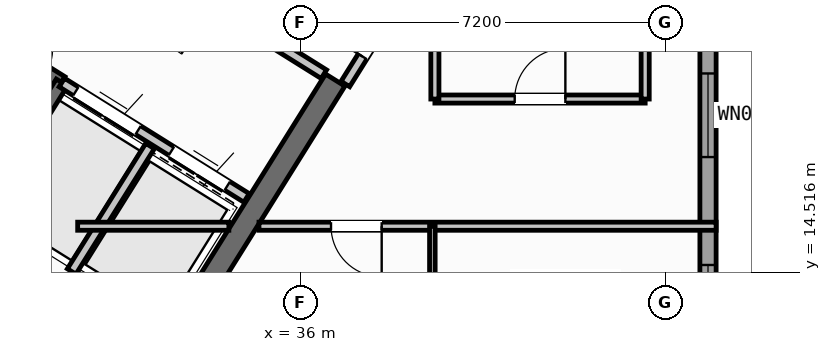
"""IFC4 building model, lengths in metres.
Left out: names, types, materials, properties, quantities, classifications, styles, units other than length and angle.
Written with IfcOpenShell. Run it as: python <this file> out.ifc"""

import sys

from ifc_helpers import new_model, si_unit, direction, frame, frame_2d, origin, place, context, subcontext, project, spatial, rectangle, extrude, source, transform, mapped, element, fill, save


model = new_model("IFC4")
c1 = context("Model", 3, precision=1e-05, world=origin(), true_north=direction((0.0, 1.0)))
c2 = subcontext(c1, "Body", "Model", "MODEL_VIEW")
j1 = project(units=[si_unit("LENGTHUNIT", "METRE"), si_unit("PLANEANGLEUNIT", "RADIAN")], contexts=[c1])
p1 = place(None, origin())
s1 = spatial("IfcSite", under=j1, at=p1, CompositionType="ELEMENT")
p2 = place(p1, origin())
s2 = spatial("IfcBuilding", under=s1, at=p2, CompositionType="ELEMENT")
p3 = place(p2, frame((0.0, 0.0, 280.8)))
s3 = spatial("IfcBuildingStorey", under=s2, at=p3, CompositionType="ELEMENT", Elevation=280.8)
p4 = place(p3, frame((33.324, 12.503, 0.0), z_axis=(0.0, 0.0, 1.0), x_axis=(-0.848043529849, 0.529926571782, 0.0)))
e1 = element("IfcWall", 1, at=p4, inside=s3, PredefinedType="SHEAR", context=c2, shape_type="SweptSolid", body=[
    extrude(rectangle(XDim=13.04, YDim=0.45, at=frame_2d((6.52, 0.0))), origin(), (0.0, 0.0, 1.0), 3.35),
])
p5 = place(p3, frame((36.683, 18.304, 0.0), z_axis=(0.0, 0.0, 1.0), x_axis=(-0.529904039071, -0.848057609704, 0.0)))
e2 = element("IfcWall", 2, at=p5, inside=s3, PredefinedType="SHEAR", context=c2, shape_type="SweptSolid", body=[
    extrude(rectangle(XDim=6.475, YDim=0.45, at=frame_2d((3.238, 0.0))), origin(), (0.0, 0.0, 1.0), 3.35),
])
p6 = place(p3, frame((44.04, 23.04, 0.0), z_axis=(0.0, 0.0, 1.0), x_axis=(0.0, -1.0, 0.0)))
e3 = element("IfcWall", 3, at=p6, inside=s3, PredefinedType="STANDARD", context=c2, shape_type="SweptSolid", body=[
    extrude(rectangle(XDim=21.08, YDim=0.32, at=frame_2d((10.54, 0.0))), origin(), (0.0, 0.0, 1.0), 3.35),
])
p7 = place(p6, frame((1.285, 0.0, 0.9)))
e4 = element("IfcOpeningElement", 4, at=p7, cuts=e3, PredefinedType="OPENING", context=c2, shape_type="SweptSolid", body=[
    extrude(rectangle(XDim=1.65, YDim=1.45, at=frame_2d((0.825, 0.725))), frame((0.0, 0.17, 0.0), z_axis=(0.0, -1.0, 0.0), x_axis=(1.0, 0.0, 0.0)), (0.0, 0.0, 1.0), 0.34),
])
p8 = place(p6, frame((4.605, 0.0, 0.9)))
e5 = element("IfcOpeningElement", 5, at=p8, cuts=e3, PredefinedType="OPENING", context=c2, shape_type="SweptSolid", body=[
    extrude(rectangle(XDim=1.65, YDim=1.45, at=frame_2d((0.825, 0.725))), frame((0.0, 0.17, 0.0), z_axis=(0.0, -1.0, 0.0), x_axis=(1.0, 0.0, 0.0)), (0.0, 0.0, 1.0), 0.34),
])
p9 = place(p6, frame((8.385, 0.0, 0.95)))
e6 = element("IfcOpeningElement", 6, at=p9, cuts=e3, PredefinedType="OPENING", context=c2, shape_type="SweptSolid", body=[
    extrude(rectangle(XDim=1.95, YDim=1.35, at=frame_2d((0.975, 0.675))), frame((0.0, 0.17, 0.0), z_axis=(0.0, -1.0, 0.0), x_axis=(1.0, 0.0, 0.0)), (0.0, 0.0, 1.0), 0.34),
])
p10 = place(p6, frame((12.354, 0.0, 1.0)))
e7 = element("IfcOpeningElement", 7, at=p10, cuts=e3, PredefinedType="OPENING", context=c2, shape_type="SweptSolid", body=[
    extrude(rectangle(XDim=0.9, YDim=1.25, at=frame_2d((0.45, 0.625))), frame((0.0, 0.17, 0.0), z_axis=(0.0, -1.0, 0.0), x_axis=(1.0, 0.0, 0.0)), (0.0, 0.0, 1.0), 0.34),
])
p11 = place(p6, frame((14.741, 0.0, 1.0)))
e8 = element("IfcOpeningElement", 8, at=p11, cuts=e3, PredefinedType="OPENING", context=c2, shape_type="SweptSolid", body=[
    extrude(rectangle(XDim=0.9, YDim=1.25, at=frame_2d((0.45, 0.625))), frame((0.0, 0.17, 0.0), z_axis=(0.0, -1.0, 0.0), x_axis=(1.0, 0.0, 0.0)), (0.0, 0.0, 1.0), 0.34),
])
p12 = place(p6, frame((18.337, 0.0, 0.9)))
e9 = element("IfcOpeningElement", 9, at=p12, cuts=e3, PredefinedType="OPENING", context=c2, shape_type="SweptSolid", body=[
    extrude(rectangle(XDim=1.35, YDim=1.45, at=frame_2d((0.675, 0.725))), frame((0.0, 0.17, 0.0), z_axis=(0.0, -1.0, 0.0), x_axis=(1.0, 0.0, 0.0)), (0.0, 0.0, 1.0), 0.34),
])
p13 = place(p3, frame((31.28, 18.261, 0.0), z_axis=(0.0, 0.0, 1.0), x_axis=(-0.848051618787, 0.529913626805, 0.0)))
e10 = element("IfcWall", 10, at=p13, inside=s3, PredefinedType="SHEAR", context=c2, shape_type="SweptSolid", body=[
    extrude(rectangle(XDim=7.46, YDim=0.26, at=frame_2d((3.73, 0.0))), origin(), (0.0, 0.0, 1.0), 3.35),
])
p14 = place(p13, frame((0.36, 0.0, 0.0)))
e11 = element("IfcOpeningElement", 11, at=p14, cuts=e10, PredefinedType="OPENING", context=c2, shape_type="SweptSolid", body=[
    extrude(rectangle(XDim=0.86, YDim=2.05, at=frame_2d((0.43, 1.025))), frame((0.0, 0.14, 0.0), z_axis=(0.0, -1.0, 0.0), x_axis=(1.0, 0.0, 0.0)), (0.0, 0.0, 1.0), 0.28),
])
p15 = place(p3, frame((31.288, 18.256, 0.0), z_axis=(0.0, 0.0, 1.0), x_axis=(-0.529943379326, -0.848033026897, 0.0)))
e12 = element("IfcWall", 12, at=p15, inside=s3, PredefinedType="SHEAR", context=c2, shape_type="SweptSolid", body=[
    extrude(rectangle(XDim=3.16, YDim=0.26, at=frame_2d((1.58, 0.0))), origin(), (0.0, 0.0, 1.0), 3.35),
])
p16 = place(p3, frame((34.933, 15.978, 0.0), z_axis=(0.0, 0.0, 1.0), x_axis=(-0.848055739377, 0.529907032327, 0.0)))
e13 = element("IfcWall", 13, at=p16, inside=s3, PredefinedType="STANDARD", context=c2, shape_type="SweptSolid", body=[
    extrude(rectangle(XDim=4.298, YDim=0.2, at=frame_2d((2.149, 0.0))), origin(), (0.0, 0.0, 1.0), 3.34),
])
p17 = place(p16, frame((0.448, 0.0, 0.0)))
e14 = element("IfcOpeningElement", 14, at=p17, cuts=e13, PredefinedType="OPENING", context=c2, shape_type="SweptSolid", body=[
    extrude(rectangle(XDim=1.3, YDim=2.2, at=frame_2d((0.65, 1.1))), frame((0.0, 0.11, 0.0), z_axis=(0.0, -1.0, 0.0), x_axis=(1.0, 0.0, 0.0)), (0.0, 0.0, 1.0), 0.22),
])
p18 = place(p16, frame((2.523, 0.0, 0.0)))
e15 = element("IfcOpeningElement", 15, at=p18, cuts=e13, PredefinedType="OPENING", context=c2, shape_type="SweptSolid", body=[
    extrude(rectangle(XDim=1.45, YDim=2.25, at=frame_2d((0.725, 1.125))), frame((0.0, 0.11, 0.0), z_axis=(0.0, -1.0, 0.0), x_axis=(1.0, 0.0, 0.0)), (0.0, 0.0, 1.0), 0.22),
])
p19 = place(p3, frame((36.459, 18.421, 0.0), z_axis=(0.0, 0.0, 1.0), x_axis=(-0.848059591691, 0.529900867089, 0.0)))
e16 = element("IfcWall", 16, at=p19, inside=s3, PredefinedType="STANDARD", context=c2, shape_type="SweptSolid", body=[
    extrude(rectangle(XDim=5.818, YDim=0.2, at=frame_2d((2.909, 0.0))), origin(), (0.0, 0.0, 1.0), 3.34),
])
p20 = place(p19, frame((2.598, 0.0, 0.0)))
e17 = element("IfcOpeningElement", 17, at=p20, cuts=e16, PredefinedType="OPENING", context=c2, shape_type="SweptSolid", body=[
    extrude(rectangle(XDim=1.15, YDim=2.1, at=frame_2d((0.575, 1.05))), frame((0.0, 0.11, 0.0), z_axis=(0.0, -1.0, 0.0), x_axis=(1.0, 0.0, 0.0)), (0.0, 0.0, 1.0), 0.22),
])
p21 = place(p3, frame((33.029, 17.003, 0.0), z_axis=(0.0, 0.0, 1.0), x_axis=(-0.529916267533, -0.848049968695, 0.0)))
e18 = element("IfcWall", 18, at=p21, inside=s3, PredefinedType="STANDARD", context=c2, shape_type="SweptSolid", body=[
    extrude(rectangle(XDim=2.92, YDim=0.2, at=frame_2d((1.46, 0.0))), origin(), (0.0, 0.0, 1.0), 3.34),
])
p22 = place(p3, frame((32.164, 10.374, 0.0), z_axis=(0.0, 0.0, 1.0), x_axis=(-0.848044107957, 0.529925646633, 0.0)))
e19 = element("IfcWall", 19, at=p22, inside=s3, PredefinedType="PARTITIONING", context=c2, shape_type="SweptSolid", body=[
    extrude(rectangle(XDim=15.57, YDim=0.16, at=frame_2d((7.785, 0.0))), origin(), (0.0, 0.0, 1.0), 3.34),
])
p23 = place(p22, frame((10.83, 0.0, 0.0)))
e20 = element("IfcOpeningElement", 20, at=p23, cuts=e19, PredefinedType="OPENING", context=c2, shape_type="SweptSolid", body=[
    extrude(rectangle(XDim=1.0, YDim=2.1, at=frame_2d((0.5, 1.05))), frame((0.0, 0.09, 0.0), z_axis=(0.0, -1.0, 0.0), x_axis=(1.0, 0.0, 0.0)), (0.0, 0.0, 1.0), 0.18),
])
p24 = place(p3, frame((38.451, 20.737, 0.0), z_axis=(0.0, 0.0, 1.0), x_axis=(-0.529924799939, -0.848044637038, 0.0)))
e21 = element("IfcWall", 21, at=p24, inside=s3, PredefinedType="STANDARD", context=c2, shape_type="SweptSolid", body=[
    extrude(rectangle(XDim=2.96, YDim=0.2, at=frame_2d((1.48, 0.0))), origin(), (0.0, 0.0, 1.0), 3.34),
])
p25 = place(p24, frame((1.46, 0.0, 0.0)))
e22 = element("IfcOpeningElement", 22, at=p25, cuts=e21, PredefinedType="OPENING", context=c2, shape_type="SweptSolid", body=[
    extrude(rectangle(XDim=0.86, YDim=2.05, at=frame_2d((0.43, 1.025))), frame((0.0, 0.11, 0.0), z_axis=(0.0, -1.0, 0.0), x_axis=(1.0, 0.0, 0.0)), (0.0, 0.0, 1.0), 0.22),
])
p26 = place(p3, frame((31.6, 15.42, 0.0), z_axis=(0.0, 0.0, 1.0), x_axis=(1.0, 0.0, 0.0)))
e23 = element("IfcWall", 23, at=p26, inside=s3, PredefinedType="PARTITIONING", context=c2, shape_type="SweptSolid", body=[
    extrude(rectangle(XDim=2.984, YDim=0.16, at=frame_2d((1.492, 0.0))), origin(), (0.0, 0.0, 1.0), 3.34),
])
p27 = place(p3, frame((35.178, 15.42, 0.0), z_axis=(0.0, 0.0, 1.0), x_axis=(1.0, 0.0, 0.0)))
e24 = element("IfcWall", 24, at=p27, inside=s3, PredefinedType="PARTITIONING", context=c2, shape_type="SweptSolid", body=[
    extrude(rectangle(XDim=9.021, YDim=0.16, at=frame_2d((4.511, 0.0))), origin(), (0.0, 0.0, 1.0), 3.34),
])
p28 = place(p27, frame((1.422, 0.0, 0.0)))
e25 = element("IfcOpeningElement", 25, at=p28, cuts=e24, PredefinedType="OPENING", context=c2, shape_type="SweptSolid", body=[
    extrude(rectangle(XDim=1.0, YDim=2.1, at=frame_2d((0.5, 1.05))), frame((0.0, 0.09, 0.0), z_axis=(0.0, -1.0, 0.0), x_axis=(1.0, 0.0, 0.0)), (0.0, 0.0, 1.0), 0.18),
])
p29 = place(p3, frame((38.65, 17.93, 0.0), z_axis=(0.0, 0.0, 1.0), x_axis=(1.0, 0.0, 0.0)))
e26 = element("IfcWall", 26, at=p29, inside=s3, PredefinedType="PARTITIONING", context=c2, shape_type="SweptSolid", body=[
    extrude(rectangle(XDim=4.15, YDim=0.16, at=frame_2d((2.075, 0.0))), origin(), (0.0, 0.0, 1.0), 3.34),
])
p30 = place(p29, frame((1.575, 0.0, 0.0)))
e27 = element("IfcOpeningElement", 27, at=p30, cuts=e26, PredefinedType="OPENING", context=c2, shape_type="SweptSolid", body=[
    extrude(rectangle(XDim=1.0, YDim=2.1, at=frame_2d((0.5, 1.05))), frame((0.0, 0.09, 0.0), z_axis=(0.0, -1.0, 0.0), x_axis=(1.0, 0.0, 0.0)), (0.0, 0.0, 1.0), 0.18),
])
p31 = place(p3, frame((38.65, 17.93, 0.0), z_axis=(0.0, 0.0, 1.0), x_axis=(0.0, 1.0, 0.0)))
e28 = element("IfcWall", 28, at=p31, inside=s3, PredefinedType="PARTITIONING", context=c2, shape_type="SweptSolid", body=[
    extrude(rectangle(XDim=3.046, YDim=0.16, at=frame_2d((1.523, 0.0))), origin(), (0.0, 0.0, 1.0), 3.34),
])
p32 = place(p3, frame((42.8, 17.93, 0.0), z_axis=(0.0, 0.0, 1.0), x_axis=(0.0, 1.0, 0.0)))
e29 = element("IfcWall", 29, at=p32, inside=s3, PredefinedType="PARTITIONING", context=c2, shape_type="SweptSolid", body=[
    extrude(rectangle(XDim=3.57, YDim=0.16, at=frame_2d((1.785, 0.0))), origin(), (0.0, 0.0, 1.0), 3.34),
])
p33 = place(p3, frame((38.6, 1.96, 0.0), z_axis=(0.0, 0.0, 1.0), x_axis=(0.0, 1.0, 0.0)))
e30 = element("IfcWall", 30, at=p33, inside=s3, PredefinedType="PARTITIONING", context=c2, shape_type="SweptSolid", body=[
    extrude(rectangle(XDim=13.46, YDim=0.11, at=frame_2d((6.73, 0.0))), origin(), (0.0, 0.0, 1.0), 3.34),
])
p34 = place(p33, frame((5.2, 0.0, 0.0)))
e31 = element("IfcOpeningElement", 31, at=p34, cuts=e30, PredefinedType="OPENING", context=c2, shape_type="SweptSolid", body=[
    extrude(rectangle(XDim=0.92, YDim=2.08, at=frame_2d((0.46, 1.04))), frame((0.0, 0.065, 0.0), z_axis=(0.0, -1.0, 0.0), x_axis=(1.0, 0.0, 0.0)), (0.0, 0.0, 1.0), 0.13),
])
p35 = place(p33, frame((10.45, 0.0, 0.0)))
e32 = element("IfcOpeningElement", 32, at=p35, cuts=e30, PredefinedType="OPENING", context=c2, shape_type="SweptSolid", body=[
    extrude(rectangle(XDim=0.88, YDim=2.08, at=frame_2d((0.44, 1.04))), frame((0.0, 0.065, 0.0), z_axis=(0.0, -1.0, 0.0), x_axis=(1.0, 0.0, 0.0)), (0.0, 0.0, 1.0), 0.13),
])
m1 = source(origin(), c2, "Body", "SweptSolid", [
    extrude(rectangle(XDim=1.65, YDim=1.45, at=frame_2d((0.825, 0.725))), frame((0.0, 0.03, 0.0), z_axis=(0.0, -1.0, 0.0), x_axis=(1.0, 0.0, 0.0)), (0.0, 0.0, 1.0), 0.06),
])
p36 = place(p8, origin())
e33 = element("IfcWindow", 33, at=p36, inside=s3, PartitioningType="SINGLE_PANEL", PredefinedType="WINDOW", context=c2, shape_type="MappedRepresentation", body=[
    mapped(m1, transform((0.0, 0.0, 0.0), scale=1.0)),
])
fill(e5, e33)
m2 = source(origin(), c2, "Body", "SweptSolid", [
    extrude(rectangle(XDim=1.95, YDim=1.35, at=frame_2d((0.975, 0.675))), frame((0.0, 0.03, 0.0), z_axis=(0.0, -1.0, 0.0), x_axis=(1.0, 0.0, 0.0)), (0.0, 0.0, 1.0), 0.06),
])
p37 = place(p9, origin())
e34 = element("IfcWindow", 34, at=p37, inside=s3, PartitioningType="SINGLE_PANEL", PredefinedType="WINDOW", context=c2, shape_type="MappedRepresentation", body=[
    mapped(m2, transform((0.0, 0.0, 0.0), scale=1.0)),
])
fill(e6, e34)
m3 = source(origin(), c2, "Body", "SweptSolid", [
    extrude(rectangle(XDim=1.3, YDim=2.2, at=frame_2d((0.65, 1.1))), frame((0.0, 0.025, 0.0), z_axis=(0.0, -1.0, 0.0), x_axis=(1.0, 0.0, 0.0)), (0.0, 0.0, 1.0), 0.05),
])
p38 = place(p17, origin())
e35 = element("IfcDoor", 35, at=p38, inside=s3, OperationType="DOUBLE_DOOR_SLIDING", PredefinedType="DOOR", context=c2, shape_type="MappedRepresentation", body=[
    mapped(m3, transform((0.0, 0.0, 0.0), scale=1.0)),
])
fill(e14, e35)
m4 = source(origin(), c2, "Body", "SweptSolid", [
    extrude(rectangle(XDim=1.45, YDim=2.25, at=frame_2d((0.725, 1.125))), frame((0.0, 0.025, 0.0), z_axis=(0.0, -1.0, 0.0), x_axis=(1.0, 0.0, 0.0)), (0.0, 0.0, 1.0), 0.05),
])
p39 = place(p18, origin())
e36 = element("IfcDoor", 36, at=p39, inside=s3, OperationType="DOUBLE_DOOR_SLIDING", PredefinedType="DOOR", context=c2, shape_type="MappedRepresentation", body=[
    mapped(m4, transform((0.0, 0.0, 0.0), scale=1.0)),
])
fill(e15, e36)
m5 = source(origin(), c2, "Body", "SweptSolid", [
    extrude(rectangle(XDim=1.0, YDim=2.1, at=frame_2d((0.5, 1.05))), frame((0.0, 0.025, 0.0), z_axis=(0.0, -1.0, 0.0), x_axis=(1.0, 0.0, 0.0)), (0.0, 0.0, 1.0), 0.05),
])
p40 = place(p30, origin())
e37 = element("IfcDoor", 37, at=p40, inside=s3, OperationType="SINGLE_SWING_RIGHT", PredefinedType="DOOR", context=c2, shape_type="MappedRepresentation", body=[
    mapped(m5, transform((0.0, 0.0, 0.0), scale=1.0)),
])
fill(e27, e37)
m6 = source(origin(), c2, "Body", "SweptSolid", [
    extrude(rectangle(XDim=0.86, YDim=2.05, at=frame_2d((0.43, 1.025))), frame((0.0, 0.025, 0.0), z_axis=(0.0, -1.0, 0.0), x_axis=(1.0, 0.0, 0.0)), (0.0, 0.0, 1.0), 0.05),
])
p41 = place(p25, frame((0.86, 0.0, 0.0), z_axis=(0.0, 0.0, 1.0), x_axis=(-1.0, 0.0, 0.0)))
e38 = element("IfcDoor", 38, at=p41, inside=s3, OperationType="SINGLE_SWING_LEFT", PredefinedType="DOOR", context=c2, shape_type="MappedRepresentation", body=[
    mapped(m6, transform((0.0, 0.0, 0.0), scale=1.0)),
])
fill(e22, e38)
p42 = place(p28, frame((1.0, 0.0, 0.0), z_axis=(0.0, 0.0, 1.0), x_axis=(-1.0, 0.0, 0.0)))
e39 = element("IfcDoor", 39, at=p42, inside=s3, OperationType="SINGLE_SWING_LEFT", PredefinedType="DOOR", context=c2, shape_type="MappedRepresentation", body=[
    mapped(m5, transform((0.0, 0.0, 0.0), scale=1.0)),
])
fill(e25, e39)
save(model, sys.argv[1])
